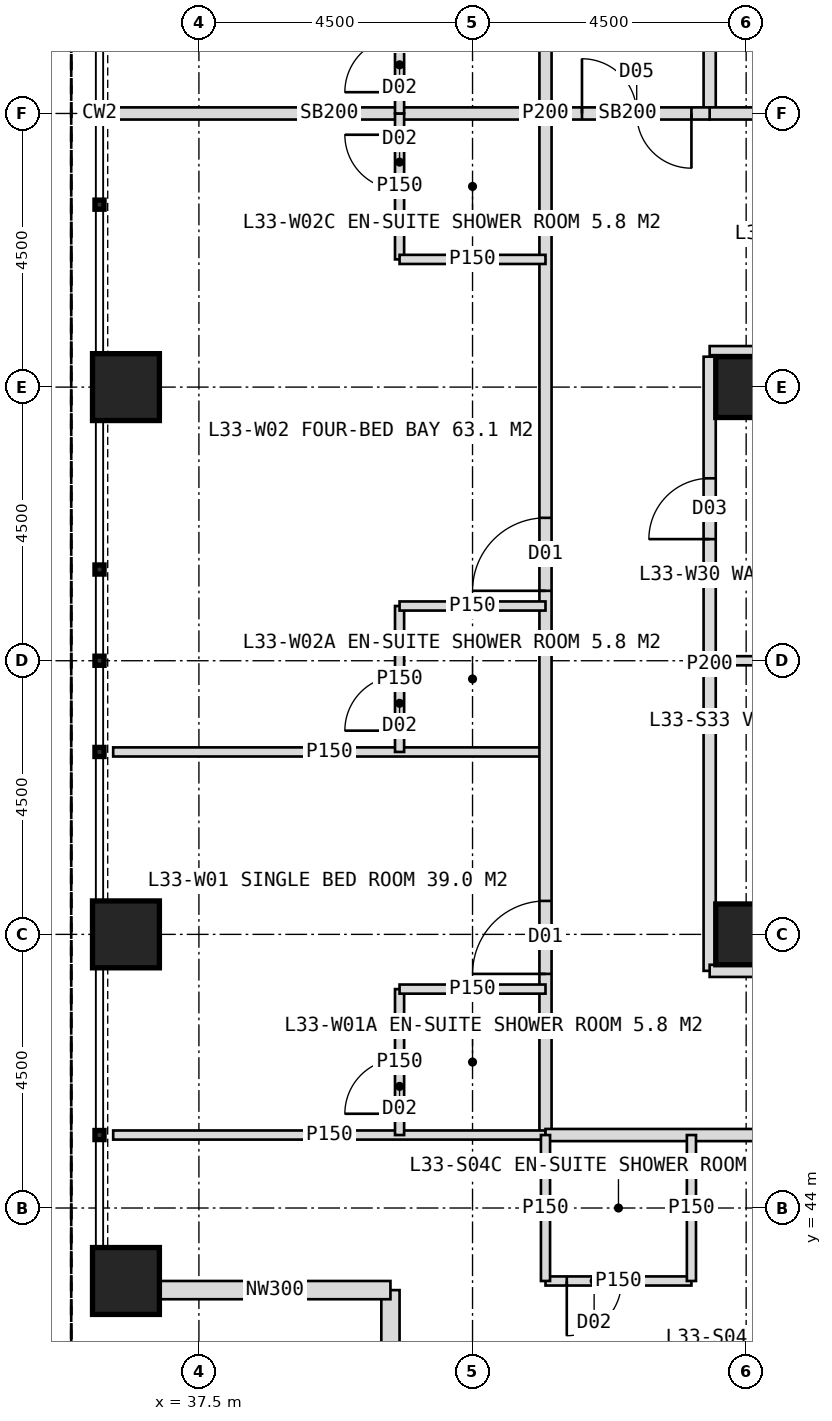
"""IFC4 building model, lengths in metres.
Left out: names, types, materials, properties, quantities, classifications, styles, units other than length and angle.
Written with IfcOpenShell. Run it as: python <this file> out.ifc"""

import sys

from ifc_helpers import new_model, si_unit, direction, frame, frame_2d, origin, origin_2d, place, context, subcontext, project, spatial, rectangle, hollow_rectangle, extrude, element, fill, save


model = new_model("IFC4")
c1 = context("Model", 3, precision=1e-05, world=origin(), true_north=direction((0.0, 1.0)))
c2 = subcontext(c1, "Body", "Model", "MODEL_VIEW")
j1 = project(units=[si_unit("LENGTHUNIT", "METRE"), si_unit("PLANEANGLEUNIT", "RADIAN")], contexts=[c1])
p1 = place(None, origin())
s1 = spatial("IfcSite", under=j1, at=p1, CompositionType="ELEMENT")
p2 = place(p1, origin())
s2 = spatial("IfcBuilding", under=s1, at=p2, CompositionType="ELEMENT")
p3 = place(p2, frame((0.0, 0.0, 140.0)))
s3 = spatial("IfcBuildingStorey", under=s2, at=p3, CompositionType="ELEMENT", Elevation=140.0)
for number, where, z_axis, x_axis in (
    (1, (46.5, 48.5, 0.0), (0.0, 0.0, 1.0), (1.0, 0.0, 0.0)),
    (2, (46.5, 57.5, 0.0), (0.0, 0.0, 1.0), (1.0, 0.0, 0.0)),
):
    element("IfcColumn", number, at=place(p3, frame(where, z_axis=z_axis, x_axis=x_axis)), inside=s3, PredefinedType="COLUMN", context=c2, shape_type="SweptSolid", body=[
        extrude(hollow_rectangle(XDim=1.0, YDim=1.0, WallThickness=0.1, at=origin_2d()), origin(), (0.0, 0.0, 1.0), 4.0),
    ])
for number, where, z_axis, x_axis in (
    (3, (36.3, 42.8, 0.0), (0.0, 0.0, 1.0), (1.0, 0.0, 0.0)),
    (4, (36.3, 48.5, 0.0), (0.0, 0.0, 1.0), (1.0, 0.0, 0.0)),
    (5, (36.3, 57.5, 0.0), (0.0, 0.0, 1.0), (1.0, 0.0, 0.0)),
):
    element("IfcColumn", number, at=place(p3, frame(where, z_axis=z_axis, x_axis=x_axis)), inside=s3, PredefinedType="COLUMN", context=c2, shape_type="SweptSolid", body=[
        extrude(hollow_rectangle(XDim=1.1, YDim=1.1, WallThickness=0.1, at=origin_2d()), origin(), (0.0, 0.0, 1.0), 4.0),
    ])
for number, where, z_axis, x_axis in (
    (6, (40.65, 38.85, 0.0), (0.0, 0.0, 1.0), (0.0, 1.0, 0.0)),
    (7, (40.65, 42.65, 0.0), (0.0, 0.0, 1.0), (-1.0, 0.0, 0.0)),
):
    element("IfcWall", number, at=place(p3, frame(where, z_axis=z_axis, x_axis=x_axis)), inside=s3, PredefinedType="ELEMENTEDWALL", context=c2, shape_type="SweptSolid", body=[
        extrude(rectangle(XDim=3.8, YDim=0.3, at=frame_2d((1.9, 0.0))), origin(), (0.0, 0.0, 1.0), 4.0),
    ])
p4 = place(p3, frame((43.2, 51.5, 0.0), z_axis=(0.0, 0.0, 1.0), x_axis=(-1.0, 0.0, 0.0)))
e8 = element("IfcWall", 8, at=p4, inside=s3, PredefinedType="PARTITIONING", context=c2, shape_type="SweptSolid", body=[
    extrude(rectangle(XDim=7.11, YDim=0.15, at=frame_2d((3.555, 0.0))), origin(), (0.0, 0.0, 1.0), 3.75),
])
p5 = place(p3, frame((43.2, 62.0, 0.0), z_axis=(0.0, 0.0, 1.0), x_axis=(-1.0, 0.0, 0.0)))
e9 = element("IfcWall", 9, at=p5, inside=s3, PredefinedType="SOLIDWALL", context=c2, shape_type="SweptSolid", body=[
    extrude(rectangle(XDim=7.11, YDim=0.2, at=frame_2d((3.555, 0.0))), origin(), (0.0, 0.0, 1.0), 2.95),
])
p6 = place(p3, frame((43.2, 45.2, 0.0), z_axis=(0.0, 0.0, 1.0), x_axis=(0.0, 1.0, 0.0)))
e10 = element("IfcWall", 10, at=p6, inside=s3, PredefinedType="PARTITIONING", context=c2, shape_type="SweptSolid", body=[
    extrude(rectangle(XDim=33.6, YDim=0.2, at=frame_2d((16.8, 0.0))), origin(), (0.0, 0.0, 1.0), 3.75),
])
p7 = place(p6, frame((2.65, 0.0, 0.0)))
e11 = element("IfcOpeningElement", 11, at=p7, cuts=e10, PredefinedType="OPENING", context=c2, shape_type="SweptSolid", body=[
    extrude(rectangle(XDim=1.2, YDim=2.2, at=frame_2d((0.6, 1.1))), frame((0.0, 0.11, 0.0), z_axis=(0.0, -1.0, 0.0), x_axis=(1.0, 0.0, 0.0)), (0.0, 0.0, 1.0), 0.22),
])
p8 = place(p6, frame((8.95, 0.0, 0.0)))
e12 = element("IfcOpeningElement", 12, at=p8, cuts=e10, PredefinedType="OPENING", context=c2, shape_type="SweptSolid", body=[
    extrude(rectangle(XDim=1.2, YDim=2.2, at=frame_2d((0.6, 1.1))), frame((0.0, 0.11, 0.0), z_axis=(0.0, -1.0, 0.0), x_axis=(1.0, 0.0, 0.0)), (0.0, 0.0, 1.0), 0.22),
])
p9 = place(p6, frame((19.45, 0.0, 0.0)))
e13 = element("IfcOpeningElement", 13, at=p9, cuts=e10, PredefinedType="OPENING", context=c2, shape_type="SweptSolid", body=[
    extrude(rectangle(XDim=1.2, YDim=2.2, at=frame_2d((0.6, 1.1))), frame((0.0, 0.11, 0.0), z_axis=(0.0, -1.0, 0.0), x_axis=(1.0, 0.0, 0.0)), (0.0, 0.0, 1.0), 0.22),
])
p10 = place(p6, frame((28.45, 0.0, 0.0)))
e14 = element("IfcOpeningElement", 14, at=p10, cuts=e10, PredefinedType="OPENING", context=c2, shape_type="SweptSolid", body=[
    extrude(rectangle(XDim=1.2, YDim=2.2, at=frame_2d((0.6, 1.1))), frame((0.0, 0.11, 0.0), z_axis=(0.0, -1.0, 0.0), x_axis=(1.0, 0.0, 0.0)), (0.0, 0.0, 1.0), 0.22),
])
p11 = place(p3, frame((43.2, 45.2, 0.0), z_axis=(0.0, 0.0, 1.0), x_axis=(-1.0, 0.0, 0.0)))
e15 = element("IfcWall", 15, at=p11, inside=s3, PredefinedType="PARTITIONING", context=c2, shape_type="SweptSolid", body=[
    extrude(rectangle(XDim=7.11, YDim=0.15, at=frame_2d((3.555, 0.0))), origin(), (0.0, 0.0, 1.0), 3.75),
])
p12 = place(p3, frame((40.8, 45.2, 0.0), z_axis=(0.0, 0.0, 1.0), x_axis=(0.0, 1.0, 0.0)))
e16 = element("IfcWall", 16, at=p12, inside=s3, PredefinedType="PARTITIONING", context=c2, shape_type="SweptSolid", body=[
    extrude(rectangle(XDim=2.4, YDim=0.15, at=frame_2d((1.2, 0.0))), origin(), (0.0, 0.0, 1.0), 2.997),
])
p13 = place(p12, frame((0.35, 0.0, 0.0)))
e17 = element("IfcOpeningElement", 17, at=p13, cuts=e16, PredefinedType="OPENING", context=c2, shape_type="SweptSolid", body=[
    extrude(rectangle(XDim=0.9, YDim=2.1, at=frame_2d((0.45, 1.05))), frame((0.0, 0.085, 0.0), z_axis=(0.0, -1.0, 0.0), x_axis=(1.0, 0.0, 0.0)), (0.0, 0.0, 1.0), 0.17),
])
p14 = place(p3, frame((43.2, 47.6, 0.0), z_axis=(0.0, 0.0, 1.0), x_axis=(-1.0, 0.0, 0.0)))
e18 = element("IfcWall", 18, at=p14, inside=s3, PredefinedType="PARTITIONING", context=c2, shape_type="SweptSolid", body=[
    extrude(rectangle(XDim=2.4, YDim=0.15, at=frame_2d((1.2, 0.0))), origin(), (0.0, 0.0, 1.0), 3.75),
])
p15 = place(p3, frame((40.8, 51.5, 0.0), z_axis=(0.0, 0.0, 1.0), x_axis=(0.0, 1.0, 0.0)))
e19 = element("IfcWall", 19, at=p15, inside=s3, PredefinedType="PARTITIONING", context=c2, shape_type="SweptSolid", body=[
    extrude(rectangle(XDim=2.4, YDim=0.15, at=frame_2d((1.2, 0.0))), origin(), (0.0, 0.0, 1.0), 3.75),
])
p16 = place(p15, frame((0.35, 0.0, 0.0)))
e20 = element("IfcOpeningElement", 20, at=p16, cuts=e19, PredefinedType="OPENING", context=c2, shape_type="SweptSolid", body=[
    extrude(rectangle(XDim=0.9, YDim=2.1, at=frame_2d((0.45, 1.05))), frame((0.0, 0.085, 0.0), z_axis=(0.0, -1.0, 0.0), x_axis=(1.0, 0.0, 0.0)), (0.0, 0.0, 1.0), 0.17),
])
p17 = place(p3, frame((43.2, 53.9, 0.0), z_axis=(0.0, 0.0, 1.0), x_axis=(-1.0, 0.0, 0.0)))
e21 = element("IfcWall", 21, at=p17, inside=s3, PredefinedType="PARTITIONING", context=c2, shape_type="SweptSolid", body=[
    extrude(rectangle(XDim=2.4, YDim=0.15, at=frame_2d((1.2, 0.0))), origin(), (0.0, 0.0, 1.0), 3.75),
])
p18 = place(p3, frame((40.8, 59.6, 0.0), z_axis=(0.0, 0.0, 1.0), x_axis=(0.0, 1.0, 0.0)))
e22 = element("IfcWall", 22, at=p18, inside=s3, PredefinedType="PARTITIONING", context=c2, shape_type="SweptSolid", body=[
    extrude(rectangle(XDim=2.4, YDim=0.15, at=frame_2d((1.2, 0.0))), origin(), (0.0, 0.0, 1.0), 3.75),
])
p19 = place(p18, frame((1.15, 0.0, 0.0)))
e23 = element("IfcOpeningElement", 23, at=p19, cuts=e22, PredefinedType="OPENING", context=c2, shape_type="SweptSolid", body=[
    extrude(rectangle(XDim=0.9, YDim=2.1, at=frame_2d((0.45, 1.05))), frame((0.0, 0.085, 0.0), z_axis=(0.0, -1.0, 0.0), x_axis=(1.0, 0.0, 0.0)), (0.0, 0.0, 1.0), 0.17),
])
p20 = place(p3, frame((43.2, 59.6, 0.0), z_axis=(0.0, 0.0, 1.0), x_axis=(-1.0, 0.0, 0.0)))
e24 = element("IfcWall", 24, at=p20, inside=s3, PredefinedType="PARTITIONING", context=c2, shape_type="SweptSolid", body=[
    extrude(rectangle(XDim=2.4, YDim=0.15, at=frame_2d((1.2, 0.0))), origin(), (0.0, 0.0, 1.0), 3.75),
])
p21 = place(p3, frame((40.8, 62.0, 0.0), z_axis=(0.0, 0.0, 1.0), x_axis=(0.0, 1.0, 0.0)))
e25 = element("IfcWall", 25, at=p21, inside=s3, PredefinedType="PARTITIONING", context=c2, shape_type="SweptSolid", body=[
    extrude(rectangle(XDim=2.4, YDim=0.15, at=frame_2d((1.2, 0.0))), origin(), (0.0, 0.0, 1.0), 3.75),
])
p22 = place(p21, frame((0.35, 0.0, 0.0)))
e26 = element("IfcOpeningElement", 26, at=p22, cuts=e25, PredefinedType="OPENING", context=c2, shape_type="SweptSolid", body=[
    extrude(rectangle(XDim=0.9, YDim=2.1, at=frame_2d((0.45, 1.05))), frame((0.0, 0.085, 0.0), z_axis=(0.0, -1.0, 0.0), x_axis=(1.0, 0.0, 0.0)), (0.0, 0.0, 1.0), 0.17),
])
p23 = place(p3, frame((51.0, 53.0, 0.0), z_axis=(0.0, 0.0, 1.0), x_axis=(-1.0, 0.0, 0.0)))
e27 = element("IfcWall", 27, at=p23, inside=s3, PredefinedType="PARTITIONING", context=c2, shape_type="SweptSolid", body=[
    extrude(rectangle(XDim=5.1, YDim=0.15, at=frame_2d((2.55, 0.0))), origin(), (0.0, 0.0, 1.0), 3.75),
])
p24 = place(p3, frame((45.9, 47.9, 0.0), z_axis=(0.0, 0.0, 1.0), x_axis=(0.0, 1.0, 0.0)))
e28 = element("IfcWall", 28, at=p24, inside=s3, PredefinedType="PARTITIONING", context=c2, shape_type="SweptSolid", body=[
    extrude(rectangle(XDim=10.1, YDim=0.2, at=frame_2d((5.05, 0.0))), origin(), (0.0, 0.0, 1.0), 3.75),
])
p25 = place(p24, frame((7.1, 0.0, 0.0)))
e29 = element("IfcOpeningElement", 29, at=p25, cuts=e28, PredefinedType="OPENING", context=c2, shape_type="SweptSolid", body=[
    extrude(rectangle(XDim=1.0, YDim=2.1, at=frame_2d((0.5, 1.05))), frame((0.0, 0.11, 0.0), z_axis=(0.0, -1.0, 0.0), x_axis=(1.0, 0.0, 0.0)), (0.0, 0.0, 1.0), 0.22),
])
p26 = place(p3, frame((45.9, 62.0, 0.0), z_axis=(0.0, 0.0, 1.0), x_axis=(0.0, 1.0, 0.0)))
e30 = element("IfcWall", 30, at=p26, inside=s3, PredefinedType="PARTITIONING", context=c2, shape_type="SweptSolid", body=[
    extrude(rectangle(XDim=14.1, YDim=0.2, at=frame_2d((7.05, 0.0))), origin(), (0.0, 0.0, 1.0), 3.75),
])
p27 = place(p26, frame((1.45, 0.0, 0.0)))
e31 = element("IfcOpeningElement", 31, at=p27, cuts=e30, PredefinedType="OPENING", context=c2, shape_type="SweptSolid", body=[
    extrude(rectangle(XDim=1.0, YDim=2.1, at=frame_2d((0.5, 1.05))), frame((0.0, 0.11, 0.0), z_axis=(0.0, -1.0, 0.0), x_axis=(1.0, 0.0, 0.0)), (0.0, 0.0, 1.0), 0.22),
])
p28 = place(p26, frame((10.3, 0.0, 0.0)))
e32 = element("IfcOpeningElement", 32, at=p28, cuts=e30, PredefinedType="OPENING", context=c2, shape_type="SweptSolid", body=[
    extrude(rectangle(XDim=1.0, YDim=2.1, at=frame_2d((0.5, 1.05))), frame((0.0, 0.11, 0.0), z_axis=(0.0, -1.0, 0.0), x_axis=(1.0, 0.0, 0.0)), (0.0, 0.0, 1.0), 0.22),
])
p29 = place(p3, frame((51.0, 58.1, 0.0), z_axis=(0.0, 0.0, 1.0), x_axis=(-1.0, 0.0, 0.0)))
e33 = element("IfcWall", 33, at=p29, inside=s3, PredefinedType="PARTITIONING", context=c2, shape_type="SweptSolid", body=[
    extrude(rectangle(XDim=5.1, YDim=0.15, at=frame_2d((2.55, 0.0))), origin(), (0.0, 0.0, 1.0), 3.75),
])
p30 = place(p29, frame((0.6, 0.0, 0.0)))
e34 = element("IfcOpeningElement", 34, at=p30, cuts=e33, PredefinedType="OPENING", context=c2, shape_type="SweptSolid", body=[
    extrude(rectangle(XDim=0.9, YDim=2.1, at=frame_2d((0.45, 1.05))), frame((0.0, 0.085, 0.0), z_axis=(0.0, -1.0, 0.0), x_axis=(1.0, 0.0, 0.0)), (0.0, 0.0, 1.0), 0.17),
])
p31 = place(p3, frame((51.0, 62.0, 0.0), z_axis=(0.0, 0.0, 1.0), x_axis=(-1.0, 0.0, 0.0)))
e35 = element("IfcWall", 35, at=p31, inside=s3, PredefinedType="SOLIDWALL", context=c2, shape_type="SweptSolid", body=[
    extrude(rectangle(XDim=5.1, YDim=0.2, at=frame_2d((2.55, 0.0))), origin(), (0.0, 0.0, 1.0), 2.95),
])
p32 = place(p3, frame((76.8, 45.2, 0.0), z_axis=(0.0, 0.0, 1.0), x_axis=(-1.0, 0.0, 0.0)))
e36 = element("IfcWall", 36, at=p32, inside=s3, PredefinedType="PARTITIONING", context=c2, shape_type="SweptSolid", body=[
    extrude(rectangle(XDim=33.6, YDim=0.2, at=frame_2d((16.8, 0.0))), origin(), (0.0, 0.0, 1.0), 3.75),
])
p33 = place(p32, frame((2.65, 0.0, 0.0)))
e37 = element("IfcOpeningElement", 37, at=p33, cuts=e36, PredefinedType="OPENING", context=c2, shape_type="SweptSolid", body=[
    extrude(rectangle(XDim=1.2, YDim=2.2, at=frame_2d((0.6, 1.1))), frame((0.0, 0.11, 0.0), z_axis=(0.0, -1.0, 0.0), x_axis=(1.0, 0.0, 0.0)), (0.0, 0.0, 1.0), 0.22),
])
p34 = place(p32, frame((11.05, 0.0, 0.0)))
e38 = element("IfcOpeningElement", 38, at=p34, cuts=e36, PredefinedType="OPENING", context=c2, shape_type="SweptSolid", body=[
    extrude(rectangle(XDim=1.2, YDim=2.2, at=frame_2d((0.6, 1.1))), frame((0.0, 0.11, 0.0), z_axis=(0.0, -1.0, 0.0), x_axis=(1.0, 0.0, 0.0)), (0.0, 0.0, 1.0), 0.22),
])
p35 = place(p32, frame((17.95, 0.0, 0.0)))
e39 = element("IfcOpeningElement", 39, at=p35, cuts=e36, PredefinedType="OPENING", context=c2, shape_type="SweptSolid", body=[
    extrude(rectangle(XDim=1.2, YDim=2.2, at=frame_2d((0.6, 1.1))), frame((0.0, 0.11, 0.0), z_axis=(0.0, -1.0, 0.0), x_axis=(1.0, 0.0, 0.0)), (0.0, 0.0, 1.0), 0.22),
])
p36 = place(p32, frame((26.95, 0.0, 0.0)))
e40 = element("IfcOpeningElement", 40, at=p36, cuts=e36, PredefinedType="OPENING", context=c2, shape_type="SweptSolid", body=[
    extrude(rectangle(XDim=1.2, YDim=2.2, at=frame_2d((0.6, 1.1))), frame((0.0, 0.11, 0.0), z_axis=(0.0, -1.0, 0.0), x_axis=(1.0, 0.0, 0.0)), (0.0, 0.0, 1.0), 0.22),
])
p37 = place(p3, frame((45.6, 42.8, 0.0), z_axis=(0.0, 0.0, 1.0), x_axis=(-1.0, 0.0, 0.0)))
e41 = element("IfcWall", 41, at=p37, inside=s3, PredefinedType="PARTITIONING", context=c2, shape_type="SweptSolid", body=[
    extrude(rectangle(XDim=2.4, YDim=0.15, at=frame_2d((1.2, 0.0))), origin(), (0.0, 0.0, 1.0), 2.997),
])
p38 = place(p37, frame((1.15, 0.0, 0.0)))
e42 = element("IfcOpeningElement", 42, at=p38, cuts=e41, PredefinedType="OPENING", context=c2, shape_type="SweptSolid", body=[
    extrude(rectangle(XDim=0.9, YDim=2.1, at=frame_2d((0.45, 1.05))), frame((0.0, 0.085, 0.0), z_axis=(0.0, -1.0, 0.0), x_axis=(1.0, 0.0, 0.0)), (0.0, 0.0, 1.0), 0.17),
])
for number, where, z_axis, x_axis in (
    (43, (45.6, 45.2, 0.0), (0.0, 0.0, 1.0), (0.0, -1.0, 0.0)),
    (44, (43.2, 45.2, 0.0), (0.0, 0.0, 1.0), (0.0, -1.0, 0.0)),
):
    element("IfcWall", number, at=place(p3, frame(where, z_axis=z_axis, x_axis=x_axis)), inside=s3, PredefinedType="PARTITIONING", context=c2, shape_type="SweptSolid", body=[
        extrude(rectangle(XDim=2.4, YDim=0.15, at=frame_2d((1.2, 0.0))), origin(), (0.0, 0.0, 1.0), 3.75),
    ])
p39 = place(p3, frame((57.75, 47.9, 0.0), z_axis=(0.0, 0.0, 1.0), x_axis=(-1.0, 0.0, 0.0)))
e45 = element("IfcWall", 45, at=p39, inside=s3, PredefinedType="PARTITIONING", context=c2, shape_type="SweptSolid", body=[
    extrude(rectangle(XDim=11.85, YDim=0.2, at=frame_2d((5.925, 0.0))), origin(), (0.0, 0.0, 1.0), 3.75),
])
p40 = place(p39, frame((0.325, 0.0, 0.0)))
e46 = element("IfcOpeningElement", 46, at=p40, cuts=e45, PredefinedType="OPENING", context=c2, shape_type="SweptSolid", body=[
    extrude(rectangle(XDim=1.0, YDim=2.1, at=frame_2d((0.5, 1.05))), frame((0.0, 0.11, 0.0), z_axis=(0.0, -1.0, 0.0), x_axis=(1.0, 0.0, 0.0)), (0.0, 0.0, 1.0), 0.22),
])
p41 = place(p39, frame((4.75, 0.0, 0.0)))
e47 = element("IfcOpeningElement", 47, at=p41, cuts=e45, PredefinedType="OPENING", context=c2, shape_type="SweptSolid", body=[
    extrude(rectangle(XDim=1.0, YDim=2.1, at=frame_2d((0.5, 1.05))), frame((0.0, 0.11, 0.0), z_axis=(0.0, -1.0, 0.0), x_axis=(1.0, 0.0, 0.0)), (0.0, 0.0, 1.0), 0.22),
])
p42 = place(p39, frame((8.8, 0.0, 0.0)))
e48 = element("IfcOpeningElement", 48, at=p42, cuts=e45, PredefinedType="OPENING", context=c2, shape_type="SweptSolid", body=[
    extrude(rectangle(XDim=1.0, YDim=2.1, at=frame_2d((0.5, 1.05))), frame((0.0, 0.11, 0.0), z_axis=(0.0, -1.0, 0.0), x_axis=(1.0, 0.0, 0.0)), (0.0, 0.0, 1.0), 0.22),
])
p43 = place(p3, frame((45.9, 62.0, 0.0), z_axis=(0.0, 0.0, 1.0), x_axis=(-1.0, 0.0, 0.0)))
e49 = element("IfcWall", 49, at=p43, inside=s3, PredefinedType="SOLIDWALL", context=c2, shape_type="SweptSolid", body=[
    extrude(rectangle(XDim=2.7, YDim=0.2, at=frame_2d((1.35, 0.0))), origin(), (0.0, 0.0, 1.0), 2.95),
])
p44 = place(p43, frame((0.3, 0.0, 0.0)))
e50 = element("IfcOpeningElement", 50, at=p44, cuts=e49, PredefinedType="OPENING", context=c2, shape_type="SweptSolid", body=[
    extrude(rectangle(XDim=1.8, YDim=2.2, at=frame_2d((0.9, 1.1))), frame((0.0, 0.11, 0.0), z_axis=(0.0, -1.0, 0.0), x_axis=(1.0, 0.0, 0.0)), (0.0, 0.0, 1.0), 0.22),
])
p45 = place(p7, origin())
e51 = element("IfcDoor", 51, at=p45, inside=s3, OperationType="SINGLE_SWING_LEFT", PredefinedType="DOOR", context=c2, shape_type="SweptSolid", body=[
    extrude(rectangle(XDim=1.2, YDim=2.2, at=frame_2d((0.6, 1.1))), frame((0.0, 0.025, 0.0), z_axis=(0.0, -1.0, 0.0), x_axis=(1.0, 0.0, 0.0)), (0.0, 0.0, 1.0), 0.05),
])
fill(e11, e51)
p46 = place(p13, origin())
e52 = element("IfcDoor", 52, at=p46, inside=s3, OperationType="SINGLE_SWING_LEFT", PredefinedType="DOOR", context=c2, shape_type="SweptSolid", body=[
    extrude(rectangle(XDim=0.9, YDim=2.1, at=frame_2d((0.45, 1.05))), frame((0.0, 0.025, 0.0), z_axis=(0.0, -1.0, 0.0), x_axis=(1.0, 0.0, 0.0)), (0.0, 0.0, 1.0), 0.05),
])
fill(e17, e52)
p47 = place(p8, origin())
e53 = element("IfcDoor", 53, at=p47, inside=s3, OperationType="SINGLE_SWING_LEFT", PredefinedType="DOOR", context=c2, shape_type="SweptSolid", body=[
    extrude(rectangle(XDim=1.2, YDim=2.2, at=frame_2d((0.6, 1.1))), frame((0.0, 0.025, 0.0), z_axis=(0.0, -1.0, 0.0), x_axis=(1.0, 0.0, 0.0)), (0.0, 0.0, 1.0), 0.05),
])
fill(e12, e53)
p48 = place(p16, origin())
e54 = element("IfcDoor", 54, at=p48, inside=s3, OperationType="SINGLE_SWING_LEFT", PredefinedType="DOOR", context=c2, shape_type="SweptSolid", body=[
    extrude(rectangle(XDim=0.9, YDim=2.1, at=frame_2d((0.45, 1.05))), frame((0.0, 0.025, 0.0), z_axis=(0.0, -1.0, 0.0), x_axis=(1.0, 0.0, 0.0)), (0.0, 0.0, 1.0), 0.05),
])
fill(e20, e54)
p49 = place(p19, origin())
e55 = element("IfcDoor", 55, at=p49, inside=s3, OperationType="SINGLE_SWING_RIGHT", PredefinedType="DOOR", context=c2, shape_type="SweptSolid", body=[
    extrude(rectangle(XDim=0.9, YDim=2.1, at=frame_2d((0.45, 1.05))), frame((0.0, 0.025, 0.0), z_axis=(0.0, -1.0, 0.0), x_axis=(1.0, 0.0, 0.0)), (0.0, 0.0, 1.0), 0.05),
])
fill(e23, e55)
p50 = place(p22, origin())
e56 = element("IfcDoor", 56, at=p50, inside=s3, OperationType="SINGLE_SWING_LEFT", PredefinedType="DOOR", context=c2, shape_type="SweptSolid", body=[
    extrude(rectangle(XDim=0.9, YDim=2.1, at=frame_2d((0.45, 1.05))), frame((0.0, 0.025, 0.0), z_axis=(0.0, -1.0, 0.0), x_axis=(1.0, 0.0, 0.0)), (0.0, 0.0, 1.0), 0.05),
])
fill(e26, e56)
p51 = place(p25, origin())
e57 = element("IfcDoor", 57, at=p51, inside=s3, OperationType="SINGLE_SWING_LEFT", PredefinedType="DOOR", context=c2, shape_type="SweptSolid", body=[
    extrude(rectangle(XDim=1.0, YDim=2.1, at=frame_2d((0.5, 1.05))), frame((0.0, 0.025, 0.0), z_axis=(0.0, -1.0, 0.0), x_axis=(1.0, 0.0, 0.0)), (0.0, 0.0, 1.0), 0.05),
])
fill(e29, e57)
p52 = place(p38, origin())
e58 = element("IfcDoor", 58, at=p52, inside=s3, OperationType="SINGLE_SWING_RIGHT", PredefinedType="DOOR", context=c2, shape_type="SweptSolid", body=[
    extrude(rectangle(XDim=0.9, YDim=2.1, at=frame_2d((0.45, 1.05))), frame((0.0, 0.025, 0.0), z_axis=(0.0, -1.0, 0.0), x_axis=(1.0, 0.0, 0.0)), (0.0, 0.0, 1.0), 0.05),
])
fill(e42, e58)
p53 = place(p44, origin())
e59 = element("IfcDoor", 59, at=p53, inside=s3, OperationType="DOUBLE_DOOR_DOUBLE_SWING", PredefinedType="DOOR", context=c2, shape_type="SweptSolid", body=[
    extrude(rectangle(XDim=1.8, YDim=2.2, at=frame_2d((0.9, 1.1))), frame((0.0, 0.025, 0.0), z_axis=(0.0, -1.0, 0.0), x_axis=(1.0, 0.0, 0.0)), (0.0, 0.0, 1.0), 0.05),
])
fill(e50, e59)
save(model, sys.argv[1])
